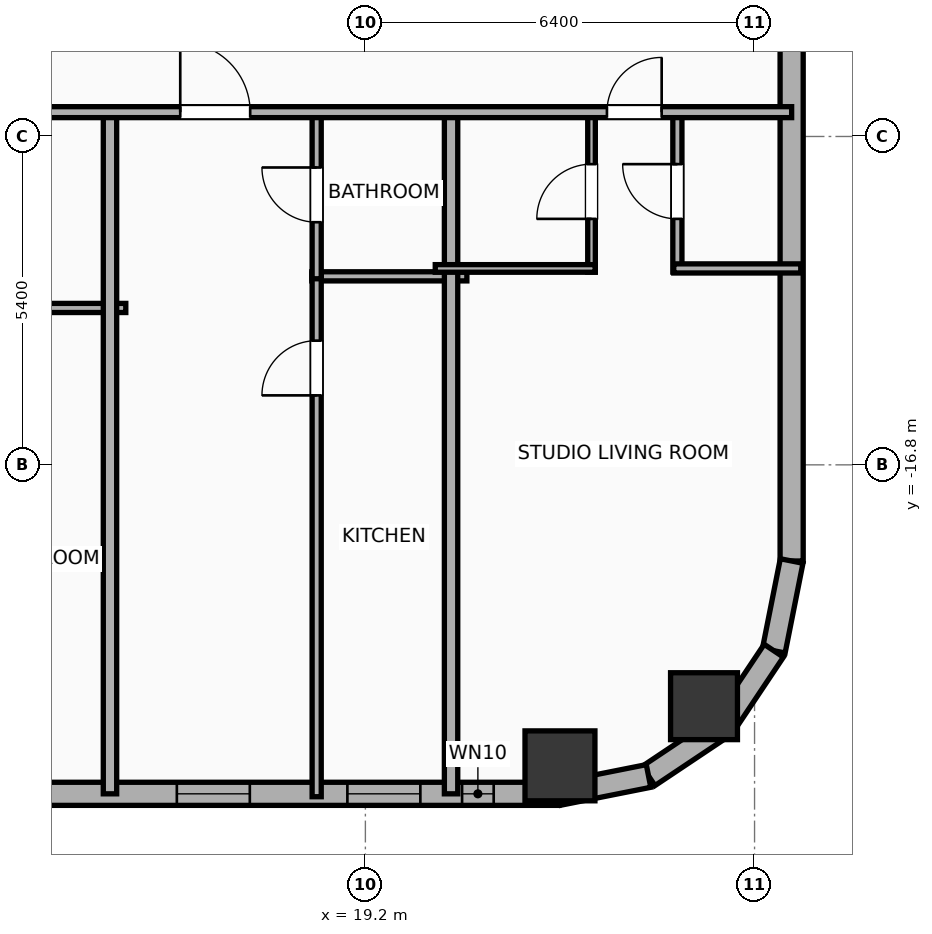
"""IFC4 building model, lengths in metres.
Left out: names, types, materials, properties, quantities, classifications, styles, units other than length and angle.
Written with IfcOpenShell. Run it as: python <this file> out.ifc"""

import sys

from ifc_helpers import new_model, si_unit, direction, frame, frame_2d, origin, origin_2d, place, context, subcontext, project, spatial, rectangle, hollow_rectangle, hollow_circle, extrude, element, fill, save


model = new_model("IFC4")
c1 = context("Model", 3, precision=1e-05, world=origin(), true_north=direction((0.0, 1.0)))
c2 = subcontext(c1, "Body", "Model", "MODEL_VIEW")
j1 = project(units=[si_unit("LENGTHUNIT", "METRE"), si_unit("PLANEANGLEUNIT", "RADIAN")], contexts=[c1])
p1 = place(None, origin())
s1 = spatial("IfcSite", under=j1, at=p1, CompositionType="ELEMENT")
p2 = place(p1, origin())
s2 = spatial("IfcBuilding", under=s1, at=p2, CompositionType="ELEMENT")
p3 = place(p2, frame((0.0, 0.0, 65.0)))
s3 = spatial("IfcBuildingStorey", under=s2, at=p3, CompositionType="ELEMENT", Elevation=65.0)
p4 = place(p3, frame((22.4, -21.75, 0.0), z_axis=(0.0, 0.0, 1.0), x_axis=(1.0, 0.0, 0.0)))
e1 = element("IfcColumn", 1, at=p4, inside=s3, PredefinedType="COLUMN", context=c2, shape_type="SweptSolid", body=[
    extrude(hollow_rectangle(XDim=1.15, YDim=1.15, WallThickness=0.04, at=origin_2d()), origin(), (0.0, 0.0, 1.0), 3.9),
])
p5 = place(p3, frame((24.769, -20.769, 0.0), z_axis=(0.0, 0.0, 1.0), x_axis=(1.0, 0.0, 0.0)))
e2 = element("IfcColumn", 2, at=p5, inside=s3, PredefinedType="COLUMN", context=c2, shape_type="SweptSolid", body=[
    extrude(hollow_circle(Radius=0.55, WallThickness=0.036, at=origin_2d()), origin(), (0.0, 0.0, 1.0), 3.9),
])
p6 = place(p3, frame((22.381, -22.21, 0.0), z_axis=(0.0, 0.0, 1.0), x_axis=(-1.0, 0.0, 0.0)))
e3 = element("IfcWall", 3, at=p6, inside=s3, PredefinedType="ELEMENTEDWALL", context=c2, shape_type="SweptSolid", body=[
    extrude(rectangle(XDim=51.963, YDim=0.38, at=frame_2d((25.981, 0.0))), origin(), (0.0, 0.0, 1.0), 3.65),
])
p7 = place(p6, frame((25.631, 0.0, 0.75)))
e4 = element("IfcOpeningElement", 4, at=p7, cuts=e3, PredefinedType="OPENING", context=c2, shape_type="SweptSolid", body=[
    extrude(rectangle(XDim=2.4, YDim=2.1, at=frame_2d((1.2, 1.05))), frame((0.0, 0.2, 0.0), z_axis=(0.0, -1.0, 0.0), x_axis=(1.0, 0.0, 0.0)), (0.0, 0.0, 1.0), 0.4),
])
p8 = place(p6, frame((42.952, 0.0, 0.75)))
e5 = element("IfcOpeningElement", 5, at=p8, cuts=e3, PredefinedType="OPENING", context=c2, shape_type="SweptSolid", body=[
    extrude(rectangle(XDim=2.4, YDim=2.1, at=frame_2d((1.2, 1.05))), frame((0.0, 0.2, 0.0), z_axis=(0.0, -1.0, 0.0), x_axis=(1.0, 0.0, 0.0)), (0.0, 0.0, 1.0), 0.4),
])
p9 = place(p6, frame((49.433, 0.0, 0.75)))
e6 = element("IfcOpeningElement", 6, at=p9, cuts=e3, PredefinedType="OPENING", context=c2, shape_type="SweptSolid", body=[
    extrude(rectangle(XDim=1.2, YDim=2.05, at=frame_2d((0.6, 1.025))), frame((0.0, 0.2, 0.0), z_axis=(0.0, -1.0, 0.0), x_axis=(1.0, 0.0, 0.0)), (0.0, 0.0, 1.0), 0.4),
])
p10 = place(p6, frame((46.695, 0.0, 0.75)))
e7 = element("IfcOpeningElement", 7, at=p10, cuts=e3, PredefinedType="OPENING", context=c2, shape_type="SweptSolid", body=[
    extrude(rectangle(XDim=1.2, YDim=2.05, at=frame_2d((0.6, 1.025))), frame((0.0, 0.2, 0.0), z_axis=(0.0, -1.0, 0.0), x_axis=(1.0, 0.0, 0.0)), (0.0, 0.0, 1.0), 0.4),
])
p11 = place(p6, frame((39.529, 0.0, 0.75)))
e8 = element("IfcOpeningElement", 8, at=p11, cuts=e3, PredefinedType="OPENING", context=c2, shape_type="SweptSolid", body=[
    extrude(rectangle(XDim=1.2, YDim=2.05, at=frame_2d((0.6, 1.025))), frame((0.0, 0.2, 0.0), z_axis=(0.0, -1.0, 0.0), x_axis=(1.0, 0.0, 0.0)), (0.0, 0.0, 1.0), 0.4),
])
p12 = place(p6, frame((36.486, 0.0, 0.75)))
e9 = element("IfcOpeningElement", 9, at=p12, cuts=e3, PredefinedType="OPENING", context=c2, shape_type="SweptSolid", body=[
    extrude(rectangle(XDim=1.2, YDim=2.05, at=frame_2d((0.6, 1.025))), frame((0.0, 0.2, 0.0), z_axis=(0.0, -1.0, 0.0), x_axis=(1.0, 0.0, 0.0)), (0.0, 0.0, 1.0), 0.4),
])
p13 = place(p6, frame((32.986, 0.0, 0.75)))
e10 = element("IfcOpeningElement", 10, at=p13, cuts=e3, PredefinedType="OPENING", context=c2, shape_type="SweptSolid", body=[
    extrude(rectangle(XDim=1.2, YDim=2.05, at=frame_2d((0.6, 1.025))), frame((0.0, 0.2, 0.0), z_axis=(0.0, -1.0, 0.0), x_axis=(1.0, 0.0, 0.0)), (0.0, 0.0, 1.0), 0.4),
])
p14 = place(p6, frame((29.126, 0.0, 0.75)))
e11 = element("IfcOpeningElement", 11, at=p14, cuts=e3, PredefinedType="OPENING", context=c2, shape_type="SweptSolid", body=[
    extrude(rectangle(XDim=1.2, YDim=2.05, at=frame_2d((0.6, 1.025))), frame((0.0, 0.2, 0.0), z_axis=(0.0, -1.0, 0.0), x_axis=(1.0, 0.0, 0.0)), (0.0, 0.0, 1.0), 0.4),
])
p15 = place(p6, frame((22.486, 0.0, 0.75)))
e12 = element("IfcOpeningElement", 12, at=p15, cuts=e3, PredefinedType="OPENING", context=c2, shape_type="SweptSolid", body=[
    extrude(rectangle(XDim=1.2, YDim=2.05, at=frame_2d((0.6, 1.025))), frame((0.0, 0.2, 0.0), z_axis=(0.0, -1.0, 0.0), x_axis=(1.0, 0.0, 0.0)), (0.0, 0.0, 1.0), 0.4),
])
p16 = place(p6, frame((18.746, 0.0, 0.75)))
e13 = element("IfcOpeningElement", 13, at=p16, cuts=e3, PredefinedType="OPENING", context=c2, shape_type="SweptSolid", body=[
    extrude(rectangle(XDim=1.2, YDim=2.05, at=frame_2d((0.6, 1.025))), frame((0.0, 0.2, 0.0), z_axis=(0.0, -1.0, 0.0), x_axis=(1.0, 0.0, 0.0)), (0.0, 0.0, 1.0), 0.4),
])
p17 = place(p6, frame((15.486, 0.0, 0.75)))
e14 = element("IfcOpeningElement", 14, at=p17, cuts=e3, PredefinedType="OPENING", context=c2, shape_type="SweptSolid", body=[
    extrude(rectangle(XDim=1.2, YDim=2.05, at=frame_2d((0.6, 1.025))), frame((0.0, 0.2, 0.0), z_axis=(0.0, -1.0, 0.0), x_axis=(1.0, 0.0, 0.0)), (0.0, 0.0, 1.0), 0.4),
])
p18 = place(p6, frame((11.986, 0.0, 0.75)))
e15 = element("IfcOpeningElement", 15, at=p18, cuts=e3, PredefinedType="OPENING", context=c2, shape_type="SweptSolid", body=[
    extrude(rectangle(XDim=1.2, YDim=2.05, at=frame_2d((0.6, 1.025))), frame((0.0, 0.2, 0.0), z_axis=(0.0, -1.0, 0.0), x_axis=(1.0, 0.0, 0.0)), (0.0, 0.0, 1.0), 0.4),
])
p19 = place(p6, frame((8.366, 0.0, 0.75)))
e16 = element("IfcOpeningElement", 16, at=p19, cuts=e3, PredefinedType="OPENING", context=c2, shape_type="SweptSolid", body=[
    extrude(rectangle(XDim=1.2, YDim=2.05, at=frame_2d((0.6, 1.025))), frame((0.0, 0.2, 0.0), z_axis=(0.0, -1.0, 0.0), x_axis=(1.0, 0.0, 0.0)), (0.0, 0.0, 1.0), 0.4),
])
p20 = place(p6, frame((5.082, 0.0, 0.75)))
e17 = element("IfcOpeningElement", 17, at=p20, cuts=e3, PredefinedType="OPENING", context=c2, shape_type="SweptSolid", body=[
    extrude(rectangle(XDim=1.2, YDim=2.05, at=frame_2d((0.6, 1.025))), frame((0.0, 0.2, 0.0), z_axis=(0.0, -1.0, 0.0), x_axis=(1.0, 0.0, 0.0)), (0.0, 0.0, 1.0), 0.4),
])
p21 = place(p6, frame((2.277, 0.0, 0.75)))
e18 = element("IfcOpeningElement", 18, at=p21, cuts=e3, PredefinedType="OPENING", context=c2, shape_type="SweptSolid", body=[
    extrude(rectangle(XDim=1.2, YDim=2.05, at=frame_2d((0.6, 1.025))), frame((0.0, 0.2, 0.0), z_axis=(0.0, -1.0, 0.0), x_axis=(1.0, 0.0, 0.0)), (0.0, 0.0, 1.0), 0.4),
])
p22 = place(p6, frame((1.071, 0.0, 0.75)))
e19 = element("IfcOpeningElement", 19, at=p22, cuts=e3, PredefinedType="OPENING", context=c2, shape_type="SweptSolid", body=[
    extrude(rectangle(XDim=0.52, YDim=2.05, at=frame_2d((0.26, 1.025))), frame((0.0, 0.2, 0.0), z_axis=(0.0, -1.0, 0.0), x_axis=(1.0, 0.0, 0.0)), (0.0, 0.0, 1.0), 0.4),
])
p23 = place(p3, frame((26.21, 18.381, 0.0), z_axis=(0.0, 0.0, 1.0), x_axis=(0.0, -1.0, 0.0)))
e20 = element("IfcWall", 20, at=p23, inside=s3, PredefinedType="ELEMENTEDWALL", context=c2, shape_type="SweptSolid", body=[
    extrude(rectangle(XDim=36.763, YDim=0.38, at=frame_2d((18.381, 0.0))), origin(), (0.0, 0.0, 1.0), 3.65),
])
p24 = place(p3, frame((26.21, -18.381, 0.0), z_axis=(0.0, 0.0, 1.0), x_axis=(-0.195086038585, -0.980786132421, 0.0)))
e21 = element("IfcWall", 21, at=p24, inside=s3, PredefinedType="ELEMENTEDWALL", context=c2, shape_type="SweptSolid", body=[
    extrude(rectangle(XDim=1.504, YDim=0.38, at=frame_2d((0.752, 0.0))), origin(), (0.0, 0.0, 1.0), 3.65),
])
for number, where, z_axis, x_axis in (
    (22, (25.917, -19.857, 0.0), (0.0, 0.0, 1.0), (-0.556, -0.831, 0.0)),
    (23, (25.091, -21.091, 0.0), (0.0, 0.0, 1.0), (-0.831, -0.556, 0.0)),
):
    element("IfcWall", number, at=place(p3, frame(where, z_axis=z_axis, x_axis=x_axis)), inside=s3, PredefinedType="ELEMENTEDWALL", context=c2, shape_type="SweptSolid", body=[
        extrude(rectangle(XDim=1.485, YDim=0.38, at=frame_2d((0.743, 0.0))), origin(), (0.0, 0.0, 1.0), 3.65),
    ])
p25 = place(p3, frame((23.857, -21.917, 0.0), z_axis=(0.0, 0.0, 1.0), x_axis=(-0.980786132421, -0.195086038585, 0.0)))
e24 = element("IfcWall", 24, at=p25, inside=s3, PredefinedType="ELEMENTEDWALL", context=c2, shape_type="SweptSolid", body=[
    extrude(rectangle(XDim=1.504, YDim=0.38, at=frame_2d((0.752, 0.0))), origin(), (0.0, 0.0, 1.0), 3.65),
])
p26 = place(p3, frame((11.47, -14.22, 0.0), z_axis=(0.0, 0.0, 1.0), x_axis=(1.0, 0.0, 0.0)))
e25 = element("IfcWall", 25, at=p26, inside=s3, PredefinedType="PLUMBINGWALL", context=c2, shape_type="SweptSolid", body=[
    extrude(rectangle(XDim=3.79, YDim=0.15, at=frame_2d((1.895, 0.0))), origin(), (0.0, 0.0, 1.0), 3.65),
])
p27 = place(p3, frame((15.0, -22.21, 0.0), z_axis=(0.0, 0.0, 1.0), x_axis=(0.0, 1.0, 0.0)))
e26 = element("IfcWall", 26, at=p27, inside=s3, PredefinedType="PARTITIONING", context=c2, shape_type="SweptSolid", body=[
    extrude(rectangle(XDim=11.29, YDim=0.22, at=frame_2d((5.645, 0.0))), origin(), (0.0, 0.0, 1.0), 3.65),
])
p28 = place(p3, frame((18.319, -13.7, 0.0), z_axis=(0.0, 0.0, 1.0), x_axis=(1.0, 0.0, 0.0)))
e27 = element("IfcWall", 27, at=p28, inside=s3, PredefinedType="PLUMBINGWALL", context=c2, shape_type="SweptSolid", body=[
    extrude(rectangle(XDim=2.55, YDim=0.15, at=frame_2d((1.275, 0.0))), origin(), (0.0, 0.0, 1.0), 3.65),
])
p29 = place(p3, frame((18.399, -22.258, 0.0), z_axis=(0.0, 0.0, 1.0), x_axis=(0.0, 1.0, 0.0)))
e28 = element("IfcWall", 28, at=p29, inside=s3, PredefinedType="PLUMBINGWALL", context=c2, shape_type="SweptSolid", body=[
    extrude(rectangle(XDim=8.598, YDim=0.15, at=frame_2d((4.299, 0.0))), origin(), (0.0, 0.0, 1.0), 3.65),
])
p30 = place(p29, frame((6.6, 0.0, 0.0)))
e29 = element("IfcOpeningElement", 29, at=p30, cuts=e28, PredefinedType="OPENING", context=c2, shape_type="SweptSolid", body=[
    extrude(rectangle(XDim=0.9, YDim=2.05, at=frame_2d((0.45, 1.025))), frame((0.0, 0.085, 0.0), z_axis=(0.0, -1.0, 0.0), x_axis=(1.0, 0.0, 0.0)), (0.0, 0.0, 1.0), 0.17),
])
p31 = place(p3, frame((18.399, -13.74, 0.0), z_axis=(0.0, 0.0, 1.0), x_axis=(0.0, 1.0, 0.0)))
e30 = element("IfcWall", 30, at=p31, inside=s3, PredefinedType="PLUMBINGWALL", context=c2, shape_type="SweptSolid", body=[
    extrude(rectangle(XDim=2.76, YDim=0.15, at=frame_2d((1.38, 0.0))), origin(), (0.0, 0.0, 1.0), 3.65),
])
p32 = place(p31, frame((0.93, 0.0, 0.0)))
e31 = element("IfcOpeningElement", 31, at=p32, cuts=e30, PredefinedType="OPENING", context=c2, shape_type="SweptSolid", body=[
    extrude(rectangle(XDim=0.9, YDim=2.05, at=frame_2d((0.45, 1.025))), frame((0.0, 0.085, 0.0), z_axis=(0.0, -1.0, 0.0), x_axis=(1.0, 0.0, 0.0)), (0.0, 0.0, 1.0), 0.17),
])
p33 = place(p3, frame((20.609, -22.21, 0.0), z_axis=(0.0, 0.0, 1.0), x_axis=(0.0, 1.0, 0.0)))
e32 = element("IfcWall", 32, at=p33, inside=s3, PredefinedType="PARTITIONING", context=c2, shape_type="SweptSolid", body=[
    extrude(rectangle(XDim=11.29, YDim=0.22, at=frame_2d((5.645, 0.0))), origin(), (0.0, 0.0, 1.0), 2.94),
])
p34 = place(p3, frame((22.919, -13.63, 0.0), z_axis=(0.0, 0.0, 1.0), x_axis=(0.0, 1.0, 0.0)))
e33 = element("IfcWall", 33, at=p34, inside=s3, PredefinedType="PARTITIONING", context=c2, shape_type="SweptSolid", body=[
    extrude(rectangle(XDim=2.65, YDim=0.125, at=frame_2d((1.325, 0.0))), origin(), (0.0, 0.0, 1.0), 3.65),
])
p35 = place(p34, frame((0.875, 0.0, 0.0)))
e34 = element("IfcOpeningElement", 34, at=p35, cuts=e33, PredefinedType="OPENING", context=c2, shape_type="SweptSolid", body=[
    extrude(rectangle(XDim=0.9, YDim=2.05, at=frame_2d((0.45, 1.025))), frame((0.0, 0.073, 0.0), z_axis=(0.0, -1.0, 0.0), x_axis=(1.0, 0.0, 0.0)), (0.0, 0.0, 1.0), 0.145),
])
p36 = place(p3, frame((24.331, -13.63, 0.0), z_axis=(0.0, 0.0, 1.0), x_axis=(0.0, 1.0, 0.0)))
e35 = element("IfcWall", 35, at=p36, inside=s3, PredefinedType="PLUMBINGWALL", context=c2, shape_type="SweptSolid", body=[
    extrude(rectangle(XDim=2.65, YDim=0.15, at=frame_2d((1.325, 0.0))), origin(), (0.0, 0.0, 1.0), 3.65),
])
p37 = place(p36, frame((0.875, 0.0, 0.0)))
e36 = element("IfcOpeningElement", 36, at=p37, cuts=e35, PredefinedType="OPENING", context=c2, shape_type="SweptSolid", body=[
    extrude(rectangle(XDim=0.9, YDim=2.05, at=frame_2d((0.45, 1.025))), frame((0.0, 0.085, 0.0), z_axis=(0.0, -1.0, 0.0), x_axis=(1.0, 0.0, 0.0)), (0.0, 0.0, 1.0), 0.17),
])
p38 = place(p3, frame((20.349, -13.57, 0.0), z_axis=(0.0, 0.0, 1.0), x_axis=(1.0, 0.0, 0.0)))
e37 = element("IfcWall", 37, at=p38, inside=s3, PredefinedType="PARTITIONING", context=c2, shape_type="SweptSolid", body=[
    extrude(rectangle(XDim=2.63, YDim=0.125, at=frame_2d((1.315, 0.0))), origin(), (0.0, 0.0, 1.0), 3.65),
])
p39 = place(p3, frame((24.271, -13.57, 0.0), z_axis=(0.0, 0.0, 1.0), x_axis=(1.0, 0.0, 0.0)))
e38 = element("IfcWall", 38, at=p39, inside=s3, PredefinedType="PLUMBINGWALL", context=c2, shape_type="SweptSolid", body=[
    extrude(rectangle(XDim=2.089, YDim=0.15, at=frame_2d((1.044, 0.0))), origin(), (0.0, 0.0, 1.0), 3.65),
])
p40 = place(p3, frame((-33.41, -11.0, 0.0), z_axis=(0.0, 0.0, 1.0), x_axis=(1.0, 0.0, 0.0)))
e39 = element("IfcWall", 39, at=p40, inside=s3, PredefinedType="PARTITIONING", context=c2, shape_type="SweptSolid", body=[
    extrude(rectangle(XDim=59.62, YDim=0.18, at=frame_2d((29.81, 0.0))), origin(), (0.0, 0.0, 1.0), 3.65),
])
p41 = place(p40, frame((3.08, 0.0, 0.0)))
e40 = element("IfcOpeningElement", 40, at=p41, cuts=e39, PredefinedType="OPENING", context=c2, shape_type="SweptSolid", body=[
    extrude(rectangle(XDim=0.9, YDim=2.05, at=frame_2d((0.45, 1.025))), frame((0.0, 0.1, 0.0), z_axis=(0.0, -1.0, 0.0), x_axis=(1.0, 0.0, 0.0)), (0.0, 0.0, 1.0), 0.2),
])
p42 = place(p40, frame((9.918, 0.0, 0.0)))
e41 = element("IfcOpeningElement", 41, at=p42, cuts=e39, PredefinedType="OPENING", context=c2, shape_type="SweptSolid", body=[
    extrude(rectangle(XDim=0.9, YDim=2.05, at=frame_2d((0.45, 1.025))), frame((0.0, 0.1, 0.0), z_axis=(0.0, -1.0, 0.0), x_axis=(1.0, 0.0, 0.0)), (0.0, 0.0, 1.0), 0.2),
])
p43 = place(p40, frame((16.721, 0.0, 0.0)))
e42 = element("IfcOpeningElement", 42, at=p43, cuts=e39, PredefinedType="OPENING", context=c2, shape_type="SweptSolid", body=[
    extrude(rectangle(XDim=0.9, YDim=2.05, at=frame_2d((0.45, 1.025))), frame((0.0, 0.1, 0.0), z_axis=(0.0, -1.0, 0.0), x_axis=(1.0, 0.0, 0.0)), (0.0, 0.0, 1.0), 0.2),
])
p44 = place(p40, frame((23.625, 0.0, 0.0)))
e43 = element("IfcOpeningElement", 43, at=p44, cuts=e39, PredefinedType="OPENING", context=c2, shape_type="SweptSolid", body=[
    extrude(rectangle(XDim=0.9, YDim=2.05, at=frame_2d((0.45, 1.025))), frame((0.0, 0.1, 0.0), z_axis=(0.0, -1.0, 0.0), x_axis=(1.0, 0.0, 0.0)), (0.0, 0.0, 1.0), 0.2),
])
p45 = place(p40, frame((30.624, 0.0, 0.0)))
e44 = element("IfcOpeningElement", 44, at=p45, cuts=e39, PredefinedType="OPENING", context=c2, shape_type="SweptSolid", body=[
    extrude(rectangle(XDim=0.9, YDim=2.05, at=frame_2d((0.45, 1.025))), frame((0.0, 0.1, 0.0), z_axis=(0.0, -1.0, 0.0), x_axis=(1.0, 0.0, 0.0)), (0.0, 0.0, 1.0), 0.2),
])
p46 = place(p40, frame((37.623, 0.0, 0.0)))
e45 = element("IfcOpeningElement", 45, at=p46, cuts=e39, PredefinedType="OPENING", context=c2, shape_type="SweptSolid", body=[
    extrude(rectangle(XDim=0.9, YDim=2.05, at=frame_2d((0.45, 1.025))), frame((0.0, 0.1, 0.0), z_axis=(0.0, -1.0, 0.0), x_axis=(1.0, 0.0, 0.0)), (0.0, 0.0, 1.0), 0.2),
])
p47 = place(p40, frame((44.623, 0.0, 0.0)))
e46 = element("IfcOpeningElement", 46, at=p47, cuts=e39, PredefinedType="OPENING", context=c2, shape_type="SweptSolid", body=[
    extrude(rectangle(XDim=0.9, YDim=2.05, at=frame_2d((0.45, 1.025))), frame((0.0, 0.1, 0.0), z_axis=(0.0, -1.0, 0.0), x_axis=(1.0, 0.0, 0.0)), (0.0, 0.0, 1.0), 0.2),
])
p48 = place(p40, frame((49.565, 0.0, 0.0)))
e47 = element("IfcOpeningElement", 47, at=p48, cuts=e39, PredefinedType="OPENING", context=c2, shape_type="SweptSolid", body=[
    extrude(rectangle(XDim=1.15, YDim=2.05, at=frame_2d((0.575, 1.025))), frame((0.0, 0.1, 0.0), z_axis=(0.0, -1.0, 0.0), x_axis=(1.0, 0.0, 0.0)), (0.0, 0.0, 1.0), 0.2),
])
p49 = place(p40, frame((56.583, 0.0, 0.0)))
e48 = element("IfcOpeningElement", 48, at=p49, cuts=e39, PredefinedType="OPENING", context=c2, shape_type="SweptSolid", body=[
    extrude(rectangle(XDim=0.9, YDim=2.05, at=frame_2d((0.45, 1.025))), frame((0.0, 0.1, 0.0), z_axis=(0.0, -1.0, 0.0), x_axis=(1.0, 0.0, 0.0)), (0.0, 0.0, 1.0), 0.2),
])
p50 = place(p20, origin())
e49 = element("IfcWindow", 49, at=p50, inside=s3, PartitioningType="SINGLE_PANEL", PredefinedType="WINDOW", context=c2, shape_type="SweptSolid", body=[
    extrude(rectangle(XDim=1.2, YDim=2.05, at=frame_2d((0.6, 1.025))), frame((0.0, 0.03, 0.0), z_axis=(0.0, -1.0, 0.0), x_axis=(1.0, 0.0, 0.0)), (0.0, 0.0, 1.0), 0.06),
])
fill(e17, e49)
p51 = place(p21, origin())
e50 = element("IfcWindow", 50, at=p51, inside=s3, PartitioningType="SINGLE_PANEL", PredefinedType="WINDOW", context=c2, shape_type="SweptSolid", body=[
    extrude(rectangle(XDim=1.2, YDim=2.05, at=frame_2d((0.6, 1.025))), frame((0.0, 0.03, 0.0), z_axis=(0.0, -1.0, 0.0), x_axis=(1.0, 0.0, 0.0)), (0.0, 0.0, 1.0), 0.06),
])
fill(e18, e50)
p52 = place(p22, origin())
e51 = element("IfcWindow", 51, at=p52, inside=s3, PartitioningType="SINGLE_PANEL", PredefinedType="WINDOW", context=c2, shape_type="SweptSolid", body=[
    extrude(rectangle(XDim=0.52, YDim=2.05, at=frame_2d((0.26, 1.025))), frame((0.0, 0.03, 0.0), z_axis=(0.0, -1.0, 0.0), x_axis=(1.0, 0.0, 0.0)), (0.0, 0.0, 1.0), 0.06),
])
fill(e19, e51)
p53 = place(p30, origin())
e52 = element("IfcDoor", 52, at=p53, inside=s3, OperationType="SINGLE_SWING_LEFT", PredefinedType="DOOR", context=c2, shape_type="SweptSolid", body=[
    extrude(rectangle(XDim=0.9, YDim=2.05, at=frame_2d((0.45, 1.025))), frame((0.0, 0.025, 0.0), z_axis=(0.0, -1.0, 0.0), x_axis=(1.0, 0.0, 0.0)), (0.0, 0.0, 1.0), 0.05),
])
fill(e29, e52)
p54 = place(p32, origin())
e53 = element("IfcDoor", 53, at=p54, inside=s3, OperationType="SINGLE_SWING_RIGHT", PredefinedType="DOOR", context=c2, shape_type="SweptSolid", body=[
    extrude(rectangle(XDim=0.9, YDim=2.05, at=frame_2d((0.45, 1.025))), frame((0.0, 0.025, 0.0), z_axis=(0.0, -1.0, 0.0), x_axis=(1.0, 0.0, 0.0)), (0.0, 0.0, 1.0), 0.05),
])
fill(e31, e53)
p55 = place(p35, origin())
e54 = element("IfcDoor", 54, at=p55, inside=s3, OperationType="SINGLE_SWING_LEFT", PredefinedType="DOOR", context=c2, shape_type="SweptSolid", body=[
    extrude(rectangle(XDim=0.9, YDim=2.05, at=frame_2d((0.45, 1.025))), frame((0.0, 0.025, 0.0), z_axis=(0.0, -1.0, 0.0), x_axis=(1.0, 0.0, 0.0)), (0.0, 0.0, 1.0), 0.05),
])
fill(e34, e54)
p56 = place(p37, origin())
e55 = element("IfcDoor", 55, at=p56, inside=s3, OperationType="SINGLE_SWING_RIGHT", PredefinedType="DOOR", context=c2, shape_type="SweptSolid", body=[
    extrude(rectangle(XDim=0.9, YDim=2.05, at=frame_2d((0.45, 1.025))), frame((0.0, 0.025, 0.0), z_axis=(0.0, -1.0, 0.0), x_axis=(1.0, 0.0, 0.0)), (0.0, 0.0, 1.0), 0.05),
])
fill(e36, e55)
p57 = place(p48, origin())
e56 = element("IfcDoor", 56, at=p57, inside=s3, OperationType="SINGLE_SWING_LEFT", PredefinedType="DOOR", context=c2, shape_type="SweptSolid", body=[
    extrude(rectangle(XDim=1.15, YDim=2.05, at=frame_2d((0.575, 1.025))), frame((0.0, 0.025, 0.0), z_axis=(0.0, -1.0, 0.0), x_axis=(1.0, 0.0, 0.0)), (0.0, 0.0, 1.0), 0.05),
])
fill(e47, e56)
p58 = place(p49, origin())
e57 = element("IfcDoor", 57, at=p58, inside=s3, OperationType="SINGLE_SWING_RIGHT", PredefinedType="DOOR", context=c2, shape_type="SweptSolid", body=[
    extrude(rectangle(XDim=0.9, YDim=2.05, at=frame_2d((0.45, 1.025))), frame((0.0, 0.025, 0.0), z_axis=(0.0, -1.0, 0.0), x_axis=(1.0, 0.0, 0.0)), (0.0, 0.0, 1.0), 0.05),
])
fill(e48, e57)
save(model, sys.argv[1])
